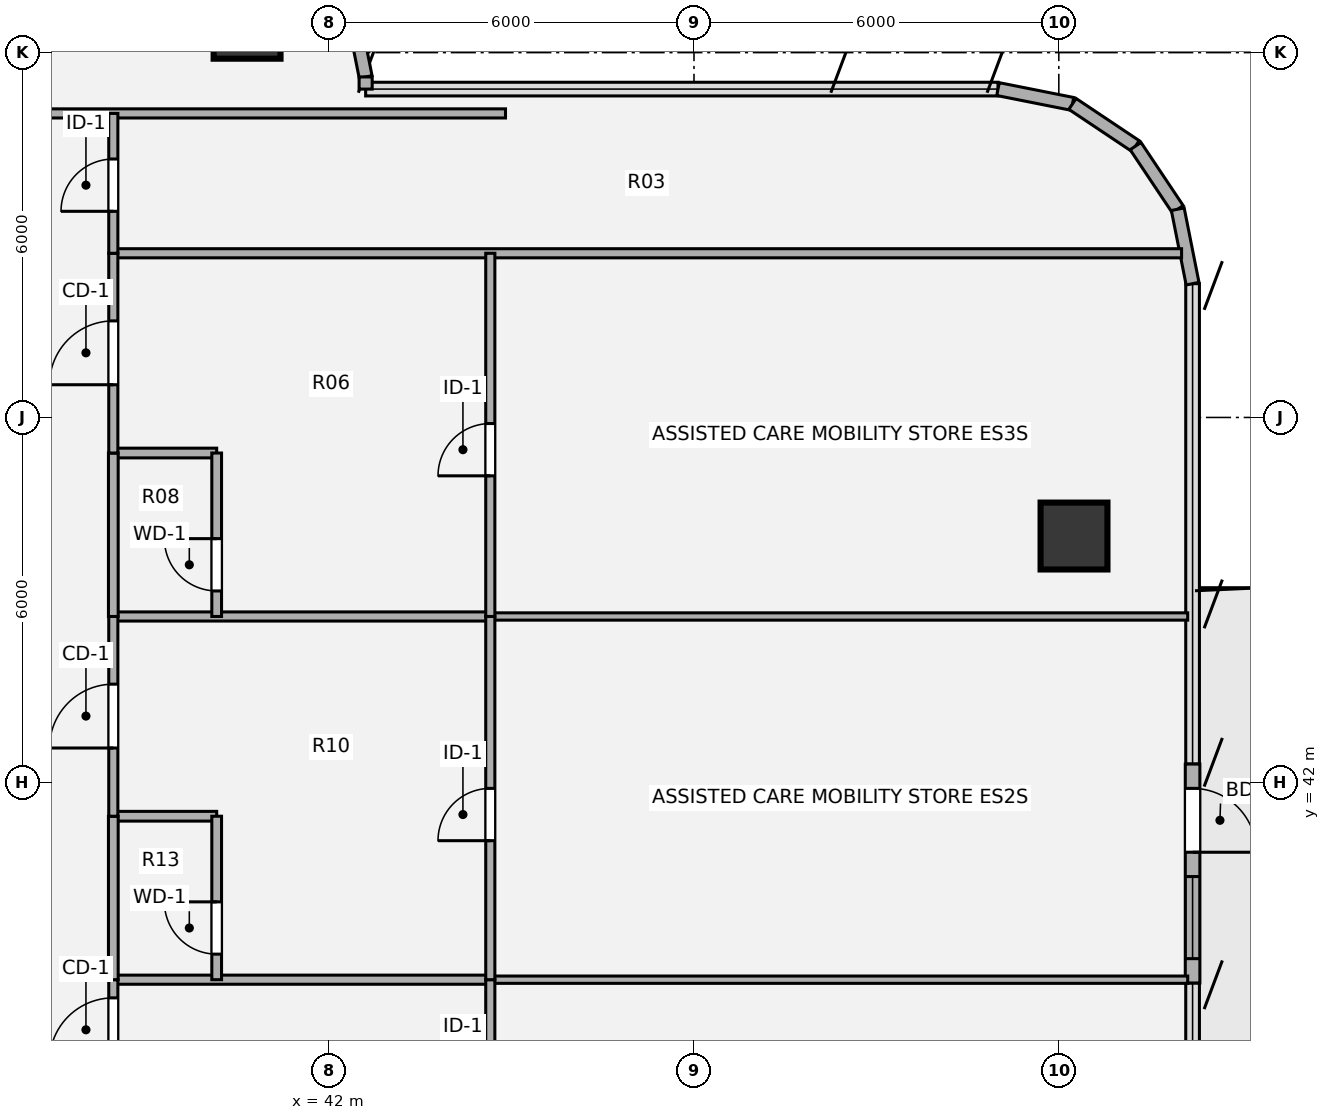
"""IFC4 building model, lengths in metres.
Left out: names, types, materials, properties, quantities, classifications, styles, units other than length and angle.
Written with IfcOpenShell. Run it as: python <this file> out.ifc"""

import sys

from ifc_helpers import new_model, si_unit, direction, frame, frame_2d, origin, origin_2d, place, context, subcontext, project, spatial, rectangle, hollow_circle, extrude, source, transform, mapped, element, fill, save


model = new_model("IFC4")
c1 = context("Model", 3, precision=1e-05, world=origin(), true_north=direction((0.0, 1.0)))
c2 = subcontext(c1, "Body", "Model", "MODEL_VIEW")
j1 = project(units=[si_unit("LENGTHUNIT", "METRE"), si_unit("PLANEANGLEUNIT", "RADIAN")], contexts=[c1])
p1 = place(None, origin())
s1 = spatial("IfcSite", under=j1, at=p1, CompositionType="ELEMENT")
p2 = place(p1, origin())
s2 = spatial("IfcBuilding", under=s1, at=p2, CompositionType="ELEMENT")
p3 = place(p2, frame((0.0, 0.0, 171.54)))
s3 = spatial("IfcBuildingStorey", under=s2, at=p3, CompositionType="ELEMENT", Elevation=171.54)
m1 = source(origin(), c2, "Body", "SweptSolid", [
    extrude(hollow_circle(Radius=0.55, WallThickness=0.04, at=origin_2d()), origin(), (0.0, 0.0, 1.0), 3.78),
])
for number, where, z_axis, x_axis in (
    (1, (54.25, 46.05, 0.0), (0.0, 0.0, 1.0), (1.0, 0.0, 0.0)),
    (2, (40.65, 54.45, 0.0), (0.0, 0.0, 1.0), (1.0, 0.0, 0.0)),
):
    element("IfcColumn", number, at=place(p3, frame(where, z_axis=z_axis, x_axis=x_axis)), inside=s3, PredefinedType="COLUMN", context=c2, shape_type="MappedRepresentation", body=[
        mapped(m1, transform((0.0, 0.0, 0.0), x_axis=(1.0, 0.0, 0.0), y_axis=(0.0, 1.0, 0.0), z_axis=(0.0, 0.0, 1.0), scale=1.0)),
    ])
p4 = place(p3, frame((42.387, 54.671, 0.0), z_axis=(0.0, 0.0, 1.0), x_axis=(0.195127417394, -0.980777900945, 0.0)))
e3 = element("IfcWall", 3, at=p4, inside=s3, PredefinedType="SOLIDWALL", context=c2, shape_type="SweptSolid", body=[
    extrude(rectangle(XDim=1.092, YDim=0.215, at=frame_2d((0.546, 0.0))), origin(), (0.0, 0.0, 1.0), 3.53),
])
p5 = place(p3, frame((42.6, 53.6, 0.0), z_axis=(0.0, 0.0, 1.0), x_axis=(0.0, -1.0, 0.0)))
e4 = element("IfcWall", 4, at=p5, inside=s3, PredefinedType="SOLIDWALL", context=c2, shape_type="SweptSolid", body=[
    extrude(rectangle(XDim=0.2, YDim=0.215, at=frame_2d((0.1, 0.0))), origin(), (0.0, 0.0, 1.0), 3.53),
])
for number, where, z_axis, x_axis in (
    (5, (53.0, 53.4, 0.0), (0.0, 0.0, 1.0), (0.981, -0.195, 0.0)),
    (6, (54.225, 53.156, 0.0), (0.0, 0.0, 1.0), (0.831, -0.556, 0.0)),
    (7, (55.263, 52.463, 0.0), (0.0, 0.0, 1.0), (0.556, -0.831, 0.0)),
    (8, (55.956, 51.425, 0.0), (0.0, 0.0, 1.0), (0.195, -0.981, 0.0)),
):
    element("IfcWall", number, at=place(p3, frame(where, z_axis=z_axis, x_axis=x_axis)), inside=s3, PredefinedType="SOLIDWALL", context=c2, shape_type="SweptSolid", body=[
        extrude(rectangle(XDim=1.249, YDim=0.215, at=frame_2d((0.624, 0.0))), origin(), (0.0, 0.0, 1.0), 3.53),
    ])
p6 = place(p3, frame((56.2, 42.3, 0.0), z_axis=(0.0, 0.0, 1.0), x_axis=(0.0, -1.0, 0.0)))
e9 = element("IfcWall", 9, at=p6, inside=s3, PredefinedType="SOLIDWALL", context=c2, shape_type="SweptSolid", body=[
    extrude(rectangle(XDim=3.6, YDim=0.24, at=frame_2d((1.8, 0.0))), origin(), (0.0, 0.0, 1.0), 3.53),
])
p7 = place(p6, frame((0.4, 0.0, 0.0)))
e10 = element("IfcOpeningElement", 10, at=p7, cuts=e9, PredefinedType="OPENING", context=c2, shape_type="SweptSolid", body=[
    extrude(rectangle(XDim=1.05, YDim=2.15, at=origin_2d()), frame((0.525, 0.13, 1.075), z_axis=(0.0, -1.0, 0.0), x_axis=(1.0, 0.0, 0.0)), (0.0, 0.0, 1.0), 0.26),
])
p8 = place(p6, frame((1.85, 0.0, 0.85)))
e11 = element("IfcOpeningElement", 11, at=p8, cuts=e9, PredefinedType="OPENING", context=c2, shape_type="SweptSolid", body=[
    extrude(rectangle(XDim=1.35, YDim=1.35, at=origin_2d()), frame((0.675, 0.13, 0.675), z_axis=(0.0, -1.0, 0.0), x_axis=(1.0, 0.0, 0.0)), (0.0, 0.0, 1.0), 0.26),
])
p9 = place(p3, frame((38.45, 38.754, 0.0), z_axis=(0.0, 0.0, 1.0), x_axis=(1.0, 0.0, 0.0)))
e12 = element("IfcWall", 12, at=p9, inside=s3, PredefinedType="PARTITIONING", context=c2, shape_type="SweptSolid", body=[
    extrude(rectangle(XDim=6.2, YDim=0.15, at=frame_2d((3.1, 0.0))), origin(), (0.0, 0.0, 1.0), 2.982),
])
p10 = place(p3, frame((44.65, 38.754, 0.0), z_axis=(0.0, 0.0, 1.0), x_axis=(1.0, 0.0, 0.0)))
e13 = element("IfcWall", 13, at=p10, inside=s3, PredefinedType="PARTITIONING", context=c2, shape_type="SweptSolid", body=[
    extrude(rectangle(XDim=11.47, YDim=0.12, at=frame_2d((5.735, 0.0))), origin(), (0.0, 0.0, 1.0), 2.982),
])
p11 = place(p3, frame((38.45, 41.442, 0.0), z_axis=(0.0, 0.0, 1.0), x_axis=(1.0, 0.0, 0.0)))
e14 = element("IfcWall", 14, at=p11, inside=s3, PredefinedType="PLUMBINGWALL", context=c2, shape_type="SweptSolid", body=[
    extrude(rectangle(XDim=1.7, YDim=0.16, at=frame_2d((0.85, 0.0))), origin(), (0.0, 0.0, 1.0), 3.259),
])
p12 = place(p3, frame((38.45, 44.727, 0.0), z_axis=(0.0, 0.0, 1.0), x_axis=(1.0, 0.0, 0.0)))
e15 = element("IfcWall", 15, at=p12, inside=s3, PredefinedType="PARTITIONING", context=c2, shape_type="SweptSolid", body=[
    extrude(rectangle(XDim=6.2, YDim=0.15, at=frame_2d((3.1, 0.0))), origin(), (0.0, 0.0, 1.0), 3.055),
])
p13 = place(p3, frame((44.65, 44.727, 0.0), z_axis=(0.0, 0.0, 1.0), x_axis=(1.0, 0.0, 0.0)))
e16 = element("IfcWall", 16, at=p13, inside=s3, PredefinedType="PARTITIONING", context=c2, shape_type="SweptSolid", body=[
    extrude(rectangle(XDim=11.47, YDim=0.12, at=frame_2d((5.735, 0.0))), origin(), (0.0, 0.0, 1.0), 3.055),
])
p14 = place(p3, frame((38.45, 47.415, 0.0), z_axis=(0.0, 0.0, 1.0), x_axis=(1.0, 0.0, 0.0)))
e17 = element("IfcWall", 17, at=p14, inside=s3, PredefinedType="PLUMBINGWALL", context=c2, shape_type="SweptSolid", body=[
    extrude(rectangle(XDim=1.7, YDim=0.16, at=frame_2d((0.85, 0.0))), origin(), (0.0, 0.0, 1.0), 3.259),
])
p15 = place(p3, frame((38.45, 50.7, 0.0), z_axis=(0.0, 0.0, 1.0), x_axis=(1.0, 0.0, 0.0)))
e18 = element("IfcWall", 18, at=p15, inside=s3, PredefinedType="PARTITIONING", context=c2, shape_type="SweptSolid", body=[
    extrude(rectangle(XDim=17.569, YDim=0.15, at=frame_2d((8.785, 0.0))), origin(), (0.0, 0.0, 1.0), 3.308),
])
p16 = place(p3, frame((27.1, 53.0, 0.0), z_axis=(0.0, 0.0, 1.0), x_axis=(1.0, 0.0, 0.0)))
e19 = element("IfcWall", 19, at=p16, inside=s3, PredefinedType="PARTITIONING", context=c2, shape_type="SweptSolid", body=[
    extrude(rectangle(XDim=17.8, YDim=0.15, at=frame_2d((8.9, 0.0))), origin(), (0.0, 0.0, 1.0), 3.308),
])
p17 = place(p16, frame((8.375, 0.0, 0.0)))
e20 = element("IfcOpeningElement", 20, at=p17, cuts=e19, PredefinedType="OPENING", context=c2, shape_type="SweptSolid", body=[
    extrude(rectangle(XDim=1.05, YDim=2.1, at=origin_2d()), frame((0.525, 0.085, 1.05), z_axis=(0.0, -1.0, 0.0), x_axis=(1.0, 0.0, 0.0)), (0.0, 0.0, 1.0), 0.17),
])
p18 = place(p3, frame((38.45, 37.097, 0.0), z_axis=(0.0, 0.0, 1.0), x_axis=(0.0, 1.0, 0.0)))
e21 = element("IfcWall", 21, at=p18, inside=s3, PredefinedType="PARTITIONING", context=c2, shape_type="SweptSolid", body=[
    extrude(rectangle(XDim=1.657, YDim=0.15, at=frame_2d((0.829, 0.0))), origin(), (0.0, 0.0, 1.0), 3.5),
])
p19 = place(p18, frame((0.308, 0.0, 0.0)))
e22 = element("IfcOpeningElement", 22, at=p19, cuts=e21, PredefinedType="OPENING", context=c2, shape_type="SweptSolid", body=[
    extrude(rectangle(XDim=1.05, YDim=2.1, at=origin_2d()), frame((0.525, 0.085, 1.05), z_axis=(0.0, -1.0, 0.0), x_axis=(1.0, 0.0, 0.0)), (0.0, 0.0, 1.0), 0.17),
])
p20 = place(p3, frame((38.45, 38.754, 0.0), z_axis=(0.0, 0.0, 1.0), x_axis=(0.0, 1.0, 0.0)))
e23 = element("IfcWall", 23, at=p20, inside=s3, PredefinedType="PLUMBINGWALL", context=c2, shape_type="SweptSolid", body=[
    extrude(rectangle(XDim=2.688, YDim=0.16, at=frame_2d((1.344, 0.0))), origin(), (0.0, 0.0, 1.0), 3.5),
])
p21 = place(p3, frame((38.45, 41.442, 0.0), z_axis=(0.0, 0.0, 1.0), x_axis=(0.0, 1.0, 0.0)))
e24 = element("IfcWall", 24, at=p21, inside=s3, PredefinedType="PARTITIONING", context=c2, shape_type="SweptSolid", body=[
    extrude(rectangle(XDim=3.285, YDim=0.15, at=frame_2d((1.643, 0.0))), origin(), (0.0, 0.0, 1.0), 3.5),
])
p22 = place(p21, frame((1.122, 0.0, 0.0)))
e25 = element("IfcOpeningElement", 25, at=p22, cuts=e24, PredefinedType="OPENING", context=c2, shape_type="SweptSolid", body=[
    extrude(rectangle(XDim=1.05, YDim=2.1, at=origin_2d()), frame((0.525, 0.085, 1.05), z_axis=(0.0, -1.0, 0.0), x_axis=(1.0, 0.0, 0.0)), (0.0, 0.0, 1.0), 0.17),
])
p23 = place(p3, frame((38.45, 44.727, 0.0), z_axis=(0.0, 0.0, 1.0), x_axis=(0.0, 1.0, 0.0)))
e26 = element("IfcWall", 26, at=p23, inside=s3, PredefinedType="PLUMBINGWALL", context=c2, shape_type="SweptSolid", body=[
    extrude(rectangle(XDim=2.688, YDim=0.16, at=frame_2d((1.344, 0.0))), origin(), (0.0, 0.0, 1.0), 3.5),
])
p24 = place(p3, frame((38.45, 47.415, 0.0), z_axis=(0.0, 0.0, 1.0), x_axis=(0.0, 1.0, 0.0)))
e27 = element("IfcWall", 27, at=p24, inside=s3, PredefinedType="PARTITIONING", context=c2, shape_type="SweptSolid", body=[
    extrude(rectangle(XDim=3.285, YDim=0.15, at=frame_2d((1.643, 0.0))), origin(), (0.0, 0.0, 1.0), 3.5),
])
p25 = place(p24, frame((1.123, 0.0, 0.0)))
e28 = element("IfcOpeningElement", 28, at=p25, cuts=e27, PredefinedType="OPENING", context=c2, shape_type="SweptSolid", body=[
    extrude(rectangle(XDim=1.05, YDim=2.1, at=origin_2d()), frame((0.525, 0.085, 1.05), z_axis=(0.0, -1.0, 0.0), x_axis=(1.0, 0.0, 0.0)), (0.0, 0.0, 1.0), 0.17),
])
p26 = place(p3, frame((38.45, 50.7, 0.0), z_axis=(0.0, 0.0, 1.0), x_axis=(0.0, 1.0, 0.0)))
e29 = element("IfcWall", 29, at=p26, inside=s3, PredefinedType="PARTITIONING", context=c2, shape_type="SweptSolid", body=[
    extrude(rectangle(XDim=2.3, YDim=0.15, at=frame_2d((1.15, 0.0))), origin(), (0.0, 0.0, 1.0), 3.5),
])
p27 = place(p26, frame((0.69, 0.0, 0.0)))
e30 = element("IfcOpeningElement", 30, at=p27, cuts=e29, PredefinedType="OPENING", context=c2, shape_type="SweptSolid", body=[
    extrude(rectangle(XDim=0.86, YDim=2.1, at=origin_2d()), frame((0.43, 0.085, 1.05), z_axis=(0.0, -1.0, 0.0), x_axis=(1.0, 0.0, 0.0)), (0.0, 0.0, 1.0), 0.17),
])
p28 = place(p3, frame((40.15, 38.754, 0.0), z_axis=(0.0, 0.0, 1.0), x_axis=(0.0, 1.0, 0.0)))
e31 = element("IfcWall", 31, at=p28, inside=s3, PredefinedType="PLUMBINGWALL", context=c2, shape_type="SweptSolid", body=[
    extrude(rectangle(XDim=2.688, YDim=0.16, at=frame_2d((1.344, 0.0))), origin(), (0.0, 0.0, 1.0), 3.5),
])
p29 = place(p28, frame((0.42, 0.0, 0.0)))
e32 = element("IfcOpeningElement", 32, at=p29, cuts=e31, PredefinedType="OPENING", context=c2, shape_type="SweptSolid", body=[
    extrude(rectangle(XDim=0.86, YDim=2.1, at=origin_2d()), frame((0.43, 0.09, 1.05), z_axis=(0.0, -1.0, 0.0), x_axis=(1.0, 0.0, 0.0)), (0.0, 0.0, 1.0), 0.18),
])
p30 = place(p3, frame((40.15, 44.727, 0.0), z_axis=(0.0, 0.0, 1.0), x_axis=(0.0, 1.0, 0.0)))
e33 = element("IfcWall", 33, at=p30, inside=s3, PredefinedType="PLUMBINGWALL", context=c2, shape_type="SweptSolid", body=[
    extrude(rectangle(XDim=2.688, YDim=0.16, at=frame_2d((1.344, 0.0))), origin(), (0.0, 0.0, 1.0), 3.5),
])
p31 = place(p30, frame((0.42, 0.0, 0.0)))
e34 = element("IfcOpeningElement", 34, at=p31, cuts=e33, PredefinedType="OPENING", context=c2, shape_type="SweptSolid", body=[
    extrude(rectangle(XDim=0.86, YDim=2.1, at=origin_2d()), frame((0.43, 0.09, 1.05), z_axis=(0.0, -1.0, 0.0), x_axis=(1.0, 0.0, 0.0)), (0.0, 0.0, 1.0), 0.18),
])
p32 = place(p3, frame((44.65, 35.677, 0.0), z_axis=(0.0, 0.0, 1.0), x_axis=(0.0, 1.0, 0.0)))
e35 = element("IfcWall", 35, at=p32, inside=s3, PredefinedType="PARTITIONING", context=c2, shape_type="SweptSolid", body=[
    extrude(rectangle(XDim=3.077, YDim=0.15, at=frame_2d((1.539, 0.0))), origin(), (0.0, 0.0, 1.0), 3.5),
])
p33 = place(p32, frame((0.863, 0.0, 0.0)))
e36 = element("IfcOpeningElement", 36, at=p33, cuts=e35, PredefinedType="OPENING", context=c2, shape_type="SweptSolid", body=[
    extrude(rectangle(XDim=0.86, YDim=2.1, at=origin_2d()), frame((0.43, 0.085, 1.05), z_axis=(0.0, -1.0, 0.0), x_axis=(1.0, 0.0, 0.0)), (0.0, 0.0, 1.0), 0.17),
])
p34 = place(p3, frame((44.65, 38.754, 0.0), z_axis=(0.0, 0.0, 1.0), x_axis=(0.0, 1.0, 0.0)))
e37 = element("IfcWall", 37, at=p34, inside=s3, PredefinedType="PARTITIONING", context=c2, shape_type="SweptSolid", body=[
    extrude(rectangle(XDim=5.973, YDim=0.15, at=frame_2d((2.987, 0.0))), origin(), (0.0, 0.0, 1.0), 3.5),
])
p35 = place(p34, frame((2.286, 0.0, 0.0)))
e38 = element("IfcOpeningElement", 38, at=p35, cuts=e37, PredefinedType="OPENING", context=c2, shape_type="SweptSolid", body=[
    extrude(rectangle(XDim=0.86, YDim=2.1, at=origin_2d()), frame((0.43, 0.085, 1.05), z_axis=(0.0, -1.0, 0.0), x_axis=(1.0, 0.0, 0.0)), (0.0, 0.0, 1.0), 0.17),
])
p36 = place(p3, frame((44.65, 44.727, 0.0), z_axis=(0.0, 0.0, 1.0), x_axis=(0.0, 1.0, 0.0)))
e39 = element("IfcWall", 39, at=p36, inside=s3, PredefinedType="PARTITIONING", context=c2, shape_type="SweptSolid", body=[
    extrude(rectangle(XDim=5.973, YDim=0.15, at=frame_2d((2.986, 0.0))), origin(), (0.0, 0.0, 1.0), 3.5),
])
p37 = place(p36, frame((2.313, 0.0, 0.0)))
e40 = element("IfcOpeningElement", 40, at=p37, cuts=e39, PredefinedType="OPENING", context=c2, shape_type="SweptSolid", body=[
    extrude(rectangle(XDim=0.86, YDim=2.1, at=origin_2d()), frame((0.43, 0.085, 1.05), z_axis=(0.0, -1.0, 0.0), x_axis=(1.0, 0.0, 0.0)), (0.0, 0.0, 1.0), 0.17),
])
m2 = source(origin(), c2, "Body", "SweptSolid", [
    extrude(rectangle(XDim=1.05, YDim=2.15, at=origin_2d()), frame((0.525, 0.025, 1.075), z_axis=(0.0, -1.0, 0.0), x_axis=(1.0, 0.0, 0.0)), (0.0, 0.0, 1.0), 0.05),
])
p38 = place(p7, origin())
e41 = element("IfcDoor", 41, at=p38, inside=s3, OperationType="SINGLE_SWING_RIGHT", PredefinedType="DOOR", context=c2, shape_type="MappedRepresentation", body=[
    mapped(m2, transform((0.0, 0.0, 0.0), x_axis=(1.0, 0.0, 0.0), y_axis=(0.0, 1.0, 0.0), z_axis=(0.0, 0.0, 1.0), scale=1.0)),
])
fill(e10, e41)
m3 = source(origin(), c2, "Body", "SweptSolid", [
    extrude(rectangle(XDim=1.35, YDim=1.35, at=origin_2d()), frame((0.675, 0.03, 0.675), z_axis=(0.0, -1.0, 0.0), x_axis=(1.0, 0.0, 0.0)), (0.0, 0.0, 1.0), 0.06),
])
p39 = place(p8, origin())
e42 = element("IfcWindow", 42, at=p39, inside=s3, PartitioningType="SINGLE_PANEL", PredefinedType="WINDOW", context=c2, shape_type="MappedRepresentation", body=[
    mapped(m3, transform((0.0, 0.0, 0.0), x_axis=(1.0, 0.0, 0.0), y_axis=(0.0, 1.0, 0.0), z_axis=(0.0, 0.0, 1.0), scale=1.0)),
])
fill(e11, e42)
m4 = source(origin(), c2, "Body", "SweptSolid", [
    extrude(rectangle(XDim=1.05, YDim=2.1, at=origin_2d()), frame((0.525, 0.025, 1.05), z_axis=(0.0, -1.0, 0.0), x_axis=(1.0, 0.0, 0.0)), (0.0, 0.0, 1.0), 0.05),
])
p40 = place(p19, origin())
e43 = element("IfcDoor", 43, at=p40, inside=s3, OperationType="SINGLE_SWING_LEFT", PredefinedType="DOOR", context=c2, shape_type="MappedRepresentation", body=[
    mapped(m4, transform((0.0, 0.0, 0.0), x_axis=(1.0, 0.0, 0.0), y_axis=(0.0, 1.0, 0.0), z_axis=(0.0, 0.0, 1.0), scale=1.0)),
])
fill(e22, e43)
p41 = place(p22, origin())
e44 = element("IfcDoor", 44, at=p41, inside=s3, OperationType="SINGLE_SWING_LEFT", PredefinedType="DOOR", context=c2, shape_type="MappedRepresentation", body=[
    mapped(m4, transform((0.0, 0.0, 0.0), x_axis=(1.0, 0.0, 0.0), y_axis=(0.0, 1.0, 0.0), z_axis=(0.0, 0.0, 1.0), scale=1.0)),
])
fill(e25, e44)
p42 = place(p25, origin())
e45 = element("IfcDoor", 45, at=p42, inside=s3, OperationType="SINGLE_SWING_LEFT", PredefinedType="DOOR", context=c2, shape_type="MappedRepresentation", body=[
    mapped(m4, transform((0.0, 0.0, 0.0), x_axis=(1.0, 0.0, 0.0), y_axis=(0.0, 1.0, 0.0), z_axis=(0.0, 0.0, 1.0), scale=1.0)),
])
fill(e28, e45)
m5 = source(origin(), c2, "Body", "SweptSolid", [
    extrude(rectangle(XDim=0.86, YDim=2.1, at=origin_2d()), frame((0.43, 0.025, 1.05), z_axis=(0.0, -1.0, 0.0), x_axis=(1.0, 0.0, 0.0)), (0.0, 0.0, 1.0), 0.05),
])
p43 = place(p27, origin())
e46 = element("IfcDoor", 46, at=p43, inside=s3, OperationType="SINGLE_SWING_LEFT", PredefinedType="DOOR", context=c2, shape_type="MappedRepresentation", body=[
    mapped(m5, transform((0.0, 0.0, 0.0), x_axis=(1.0, 0.0, 0.0), y_axis=(0.0, 1.0, 0.0), z_axis=(0.0, 0.0, 1.0), scale=1.0)),
])
fill(e30, e46)
m6 = source(origin(), c2, "Body", "SweptSolid", [
    extrude(rectangle(XDim=0.86, YDim=2.1, at=origin_2d()), frame((0.43, 0.025, 1.05), z_axis=(0.0, -1.0, 0.0), x_axis=(1.0, 0.0, 0.0)), (0.0, 0.0, 1.0), 0.05),
])
p44 = place(p29, origin())
e47 = element("IfcDoor", 47, at=p44, inside=s3, OperationType="SINGLE_SWING_RIGHT", PredefinedType="DOOR", context=c2, shape_type="MappedRepresentation", body=[
    mapped(m6, transform((0.0, 0.0, 0.0), x_axis=(1.0, 0.0, 0.0), y_axis=(0.0, 1.0, 0.0), z_axis=(0.0, 0.0, 1.0), scale=1.0)),
])
fill(e32, e47)
p45 = place(p31, origin())
e48 = element("IfcDoor", 48, at=p45, inside=s3, OperationType="SINGLE_SWING_RIGHT", PredefinedType="DOOR", context=c2, shape_type="MappedRepresentation", body=[
    mapped(m6, transform((0.0, 0.0, 0.0), x_axis=(1.0, 0.0, 0.0), y_axis=(0.0, 1.0, 0.0), z_axis=(0.0, 0.0, 1.0), scale=1.0)),
])
fill(e34, e48)
p46 = place(p35, origin())
e49 = element("IfcDoor", 49, at=p46, inside=s3, OperationType="SINGLE_SWING_LEFT", PredefinedType="DOOR", context=c2, shape_type="MappedRepresentation", body=[
    mapped(m5, transform((0.0, 0.0, 0.0), x_axis=(1.0, 0.0, 0.0), y_axis=(0.0, 1.0, 0.0), z_axis=(0.0, 0.0, 1.0), scale=1.0)),
])
fill(e38, e49)
p47 = place(p37, origin())
e50 = element("IfcDoor", 50, at=p47, inside=s3, OperationType="SINGLE_SWING_LEFT", PredefinedType="DOOR", context=c2, shape_type="MappedRepresentation", body=[
    mapped(m5, transform((0.0, 0.0, 0.0), x_axis=(1.0, 0.0, 0.0), y_axis=(0.0, 1.0, 0.0), z_axis=(0.0, 0.0, 1.0), scale=1.0)),
])
fill(e40, e50)
save(model, sys.argv[1])
